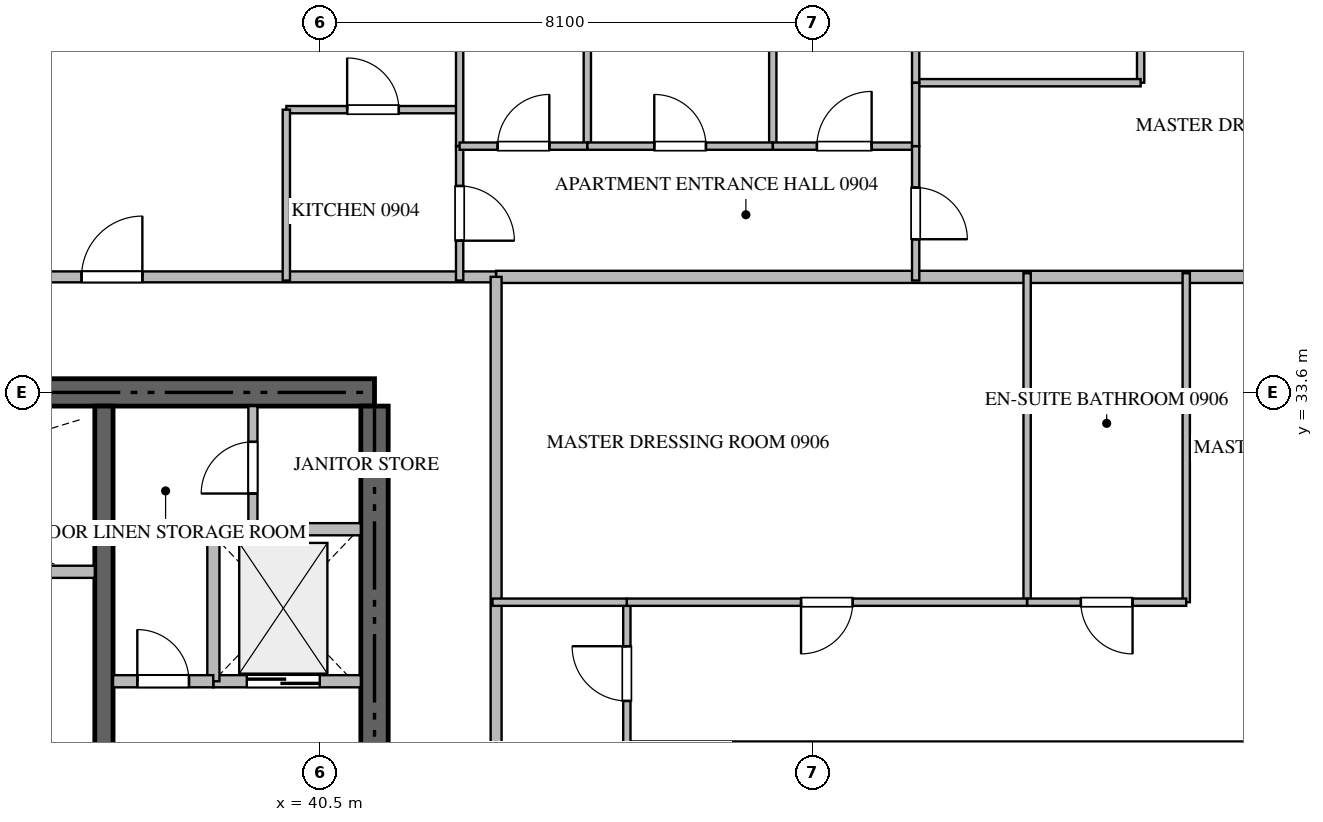
"""IFC4 building model, lengths in metres.
Left out: names, types, materials, properties, quantities, classifications, styles, units other than length and angle.
Written with IfcOpenShell. Run it as: python <this file> out.ifc"""

import sys

from ifc_helpers import new_model, si_unit, direction, frame, frame_2d, origin, place, context, subcontext, project, spatial, rectangle, extrude, source, transform, mapped, element, fill, save


model = new_model("IFC4")
c1 = context("Model", 3, precision=1e-05, world=origin(), true_north=direction((0.0, 1.0)))
c2 = subcontext(c1, "Body", "Model", "MODEL_VIEW")
j1 = project(units=[si_unit("LENGTHUNIT", "METRE"), si_unit("PLANEANGLEUNIT", "RADIAN")], contexts=[c1])
p1 = place(None, origin())
s1 = spatial("IfcSite", under=j1, at=p1, CompositionType="ELEMENT")
p2 = place(p1, origin())
s2 = spatial("IfcBuilding", under=s1, at=p2, CompositionType="ELEMENT")
p3 = place(p2, frame((0.0, 0.0, 41.7)))
s3 = spatial("IfcBuildingStorey", under=s2, at=p3, CompositionType="ELEMENT", Elevation=41.7)
p4 = place(p3, frame((41.4, 33.6, -0.26), z_axis=(0.0, 0.0, 1.0), x_axis=(-1.0, 0.0, 0.0)))
e1 = element("IfcWall", 1, at=p4, inside=s3, PredefinedType="SHEAR", context=c2, shape_type="SweptSolid", body=[
    extrude(rectangle(XDim=18.0, YDim=0.45, at=frame_2d((9.0, 0.0))), origin(), (0.0, 0.0, 1.0), 3.748),
])
p5 = place(p3, frame((41.4, 27.75, -0.26), z_axis=(0.0, 0.0, 1.0), x_axis=(0.0, 1.0, 0.0)))
e2 = element("IfcWall", 2, at=p5, inside=s3, PredefinedType="SHEAR", context=c2, shape_type="SweptSolid", body=[
    extrude(rectangle(XDim=5.625, YDim=0.45, at=frame_2d((2.812, 0.0))), origin(), (0.0, 0.0, 1.0), 3.748),
])
p6 = place(p3, frame((36.95, 27.05, -0.26), z_axis=(0.0, 0.0, 1.0), x_axis=(0.0, 1.0, 0.0)))
e3 = element("IfcWall", 3, at=p6, inside=s3, PredefinedType="SHEAR", context=c2, shape_type="SweptSolid", body=[
    extrude(rectangle(XDim=6.325, YDim=0.3, at=frame_2d((3.163, 0.0))), origin(), (0.0, 0.0, 1.0), 3.748),
])
p7 = place(p3, frame((38.75, 28.85, 0.0), z_axis=(0.0, 0.0, 1.0), x_axis=(1.0, 0.0, 0.0)))
e4 = element("IfcWall", 4, at=p7, inside=s3, PredefinedType="STANDARD", context=c2, shape_type="SweptSolid", body=[
    extrude(rectangle(XDim=2.425, YDim=0.2, at=frame_2d((1.212, 0.0))), origin(), (0.0, 0.0, 1.0), 3.49),
])
p8 = place(p7, frame((0.55, 0.0, 0.0)))
e5 = element("IfcOpeningElement", 5, at=p8, cuts=e4, PredefinedType="OPENING", context=c2, shape_type="SweptSolid", body=[
    extrude(rectangle(XDim=1.2, YDim=2.2, at=frame_2d((0.6, 1.1))), frame((0.0, 0.11, 0.0), z_axis=(0.0, -1.0, 0.0), x_axis=(1.0, 0.0, 0.0)), (0.0, 0.0, 1.0), 0.22),
])
p9 = place(p3, frame((35.0, 30.65, 0.0), z_axis=(0.0, 0.0, 1.0), x_axis=(1.0, 0.0, 0.0)))
e6 = element("IfcWall", 6, at=p9, inside=s3, PredefinedType="STANDARD", context=c2, shape_type="SweptSolid", body=[
    extrude(rectangle(XDim=1.8, YDim=0.2, at=frame_2d((0.9, 0.0))), origin(), (0.0, 0.0, 1.0), 3.49),
])
p10 = place(p3, frame((38.75, 28.85, 0.0), z_axis=(0.0, 0.0, 1.0), x_axis=(0.0, 1.0, 0.0)))
e7 = element("IfcWall", 7, at=p10, inside=s3, PredefinedType="STANDARD", context=c2, shape_type="SweptSolid", body=[
    extrude(rectangle(XDim=2.5, YDim=0.2, at=frame_2d((1.25, 0.0))), origin(), (0.0, 0.0, 1.0), 3.49),
])
p11 = place(p3, frame((38.75, 31.35, 0.0), z_axis=(0.0, 0.0, 1.0), x_axis=(1.0, 0.0, 0.0)))
e8 = element("IfcWall", 8, at=p11, inside=s3, PredefinedType="STANDARD", context=c2, shape_type="SweptSolid", body=[
    extrude(rectangle(XDim=2.425, YDim=0.2, at=frame_2d((1.212, 0.0))), origin(), (0.0, 0.0, 1.0), 3.49),
])
p12 = place(p3, frame((37.1, 28.85, 0.0), z_axis=(0.0, 0.0, 1.0), x_axis=(1.0, 0.0, 0.0)))
e9 = element("IfcWall", 9, at=p12, inside=s3, PredefinedType="STANDARD", context=c2, shape_type="SweptSolid", body=[
    extrude(rectangle(XDim=1.648, YDim=0.2, at=frame_2d((0.824, 0.0))), origin(), (0.0, 0.0, 1.0), 3.49),
])
p13 = place(p12, frame((0.399, 0.0, 0.0)))
e10 = element("IfcOpeningElement", 10, at=p13, cuts=e9, PredefinedType="OPENING", context=c2, shape_type="SweptSolid", body=[
    extrude(rectangle(XDim=0.85, YDim=2.1, at=frame_2d((0.425, 1.05))), frame((0.0, 0.11, 0.0), z_axis=(0.0, -1.0, 0.0), x_axis=(1.0, 0.0, 0.0)), (0.0, 0.0, 1.0), 0.22),
])
p14 = place(p3, frame((39.4, 31.35, 0.0), z_axis=(0.0, 0.0, 1.0), x_axis=(0.0, 1.0, 0.0)))
e11 = element("IfcWall", 11, at=p14, inside=s3, PredefinedType="PARTITIONING", context=c2, shape_type="SweptSolid", body=[
    extrude(rectangle(XDim=2.025, YDim=0.15, at=frame_2d((1.012, 0.0))), origin(), (0.0, 0.0, 1.0), 3.49),
])
p15 = place(p14, frame((0.587, 0.0, 0.0)))
e12 = element("IfcOpeningElement", 12, at=p15, cuts=e11, PredefinedType="OPENING", context=c2, shape_type="SweptSolid", body=[
    extrude(rectangle(XDim=0.85, YDim=2.1, at=frame_2d((0.425, 1.05))), frame((0.0, 0.085, 0.0), z_axis=(0.0, -1.0, 0.0), x_axis=(1.0, 0.0, 0.0)), (0.0, 0.0, 1.0), 0.17),
])
p16 = place(p3, frame((43.4, 35.5, 0.0), z_axis=(0.0, 0.0, 1.0), x_axis=(1.0, 0.0, 0.0)))
e13 = element("IfcWall", 13, at=p16, inside=s3, PredefinedType="PARTITIONING", context=c2, shape_type="SweptSolid", body=[
    extrude(rectangle(XDim=15.318, YDim=0.2, at=frame_2d((7.659, 0.0))), origin(), (0.0, 0.0, 1.0), 3.49),
])
p17 = place(p3, frame((21.402, 35.5, 0.0), z_axis=(0.0, 0.0, 1.0), x_axis=(1.0, 0.0, 0.0)))
e14 = element("IfcWall", 14, at=p17, inside=s3, PredefinedType="PARTITIONING", context=c2, shape_type="SweptSolid", body=[
    extrude(rectangle(XDim=21.996, YDim=0.18, at=frame_2d((10.998, 0.0))), origin(), (0.0, 0.0, 1.0), 3.49),
])
p18 = place(p17, frame((9.952, 0.0, 0.0)))
e15 = element("IfcOpeningElement", 15, at=p18, cuts=e14, PredefinedType="OPENING", context=c2, shape_type="SweptSolid", body=[
    extrude(rectangle(XDim=1.0, YDim=2.15, at=frame_2d((0.5, 1.075))), frame((0.0, 0.1, 0.0), z_axis=(0.0, -1.0, 0.0), x_axis=(1.0, 0.0, 0.0)), (0.0, 0.0, 1.0), 0.2),
])
p19 = place(p17, frame((15.18, 0.0, 0.0)))
e16 = element("IfcOpeningElement", 16, at=p19, cuts=e14, PredefinedType="OPENING", context=c2, shape_type="SweptSolid", body=[
    extrude(rectangle(XDim=1.0, YDim=2.15, at=frame_2d((0.5, 1.075))), frame((0.0, 0.1, 0.0), z_axis=(0.0, -1.0, 0.0), x_axis=(1.0, 0.0, 0.0)), (0.0, 0.0, 1.0), 0.2),
])
p20 = place(p3, frame((43.4, 14.9, 0.0), z_axis=(0.0, 0.0, 1.0), x_axis=(0.0, 1.0, 0.0)))
e17 = element("IfcWall", 17, at=p20, inside=s3, PredefinedType="PARTITIONING", context=c2, shape_type="SweptSolid", body=[
    extrude(rectangle(XDim=20.6, YDim=0.18, at=frame_2d((10.3, 0.0))), origin(), (0.0, 0.0, 1.0), 3.49),
])
p21 = place(p20, frame((1.96, 0.0, 0.0)))
e18 = element("IfcOpeningElement", 18, at=p21, cuts=e17, PredefinedType="OPENING", context=c2, shape_type="SweptSolid", body=[
    extrude(rectangle(XDim=1.0, YDim=2.15, at=frame_2d((0.5, 1.075))), frame((0.0, 0.1, 0.0), z_axis=(0.0, -1.0, 0.0), x_axis=(1.0, 0.0, 0.0)), (0.0, 0.0, 1.0), 0.2),
])
p22 = place(p3, frame((39.95, 38.25, 0.0), z_axis=(0.0, 0.0, 1.0), x_axis=(1.0, 0.0, 0.0)))
e19 = element("IfcWall", 19, at=p22, inside=s3, PredefinedType="PARTITIONING", context=c2, shape_type="SweptSolid", body=[
    extrude(rectangle(XDim=2.85, YDim=0.12, at=frame_2d((1.425, 0.0))), origin(), (0.0, 0.0, 1.0), 3.49),
])
p23 = place(p22, frame((1.0, 0.0, 0.0)))
e20 = element("IfcOpeningElement", 20, at=p23, cuts=e19, PredefinedType="OPENING", context=c2, shape_type="SweptSolid", body=[
    extrude(rectangle(XDim=0.85, YDim=2.1, at=frame_2d((0.425, 1.05))), frame((0.0, 0.07, 0.0), z_axis=(0.0, -1.0, 0.0), x_axis=(1.0, 0.0, 0.0)), (0.0, 0.0, 1.0), 0.14),
])
p24 = place(p3, frame((39.95, 38.25, 0.0), z_axis=(0.0, 0.0, 1.0), x_axis=(0.0, -1.0, 0.0)))
e21 = element("IfcWall", 21, at=p24, inside=s3, PredefinedType="PARTITIONING", context=c2, shape_type="SweptSolid", body=[
    extrude(rectangle(XDim=2.81, YDim=0.12, at=frame_2d((1.405, 0.0))), origin(), (0.0, 0.0, 1.0), 3.49),
])
p25 = place(p3, frame((42.8, 37.65, 0.0), z_axis=(0.0, 0.0, 1.0), x_axis=(0.0, -1.0, 0.0)))
e22 = element("IfcWall", 22, at=p25, inside=s3, PredefinedType="PARTITIONING", context=c2, shape_type="SweptSolid", body=[
    extrude(rectangle(XDim=2.21, YDim=0.12, at=frame_2d((1.105, 0.0))), origin(), (0.0, 0.0, 1.0), 3.49),
])
p26 = place(p25, frame((0.655, 0.0, 0.0)))
e23 = element("IfcOpeningElement", 23, at=p26, cuts=e22, PredefinedType="OPENING", context=c2, shape_type="SweptSolid", body=[
    extrude(rectangle(XDim=0.9, YDim=2.1, at=frame_2d((0.45, 1.05))), frame((0.0, 0.07, 0.0), z_axis=(0.0, -1.0, 0.0), x_axis=(1.0, 0.0, 0.0)), (0.0, 0.0, 1.0), 0.14),
])
p27 = place(p3, frame((42.8, 43.538, 0.0), z_axis=(0.0, 0.0, 1.0), x_axis=(0.0, -1.0, 0.0)))
e24 = element("IfcWall", 24, at=p27, inside=s3, PredefinedType="PARTITIONING", context=c2, shape_type="SweptSolid", body=[
    extrude(rectangle(XDim=5.886, YDim=0.12, at=frame_2d((2.943, 0.0))), origin(), (0.0, 0.0, 1.0), 3.49),
])
p28 = place(p3, frame((47.95, 50.105, 0.0), z_axis=(0.0, 0.0, 1.0), x_axis=(0.0, -1.0, 0.0)))
e25 = element("IfcWall", 25, at=p28, inside=s3, PredefinedType="PARTITIONING", context=c2, shape_type="SweptSolid", body=[
    extrude(rectangle(XDim=12.455, YDim=0.12, at=frame_2d((6.228, 0.0))), origin(), (0.0, 0.0, 1.0), 3.49),
])
p29 = place(p3, frame((44.9, 43.54, 0.0), z_axis=(0.0, 0.0, 1.0), x_axis=(0.0, -1.0, 0.0)))
e26 = element("IfcWall", 26, at=p29, inside=s3, PredefinedType="PARTITIONING", context=c2, shape_type="SweptSolid", body=[
    extrude(rectangle(XDim=5.89, YDim=0.12, at=frame_2d((2.945, 0.0))), origin(), (0.0, 0.0, 1.0), 3.49),
])
p30 = place(p3, frame((42.8, 37.65, 0.0), z_axis=(0.0, 0.0, 1.0), x_axis=(1.0, 0.0, 0.0)))
e27 = element("IfcWall", 27, at=p30, inside=s3, PredefinedType="PARTITIONING", context=c2, shape_type="SweptSolid", body=[
    extrude(rectangle(XDim=2.1, YDim=0.12, at=frame_2d((1.05, 0.0))), origin(), (0.0, 0.0, 1.0), 3.49),
])
p31 = place(p30, frame((0.625, 0.0, 0.0)))
e28 = element("IfcOpeningElement", 28, at=p31, cuts=e27, PredefinedType="OPENING", context=c2, shape_type="SweptSolid", body=[
    extrude(rectangle(XDim=0.85, YDim=2.1, at=frame_2d((0.425, 1.05))), frame((0.0, 0.07, 0.0), z_axis=(0.0, -1.0, 0.0), x_axis=(1.0, 0.0, 0.0)), (0.0, 0.0, 1.0), 0.14),
])
p32 = place(p3, frame((44.902, 37.65, 0.0), z_axis=(0.0, 0.0, 1.0), x_axis=(1.0, 0.0, 0.0)))
e29 = element("IfcWall", 29, at=p32, inside=s3, PredefinedType="PARTITIONING", context=c2, shape_type="SweptSolid", body=[
    extrude(rectangle(XDim=3.048, YDim=0.12, at=frame_2d((1.524, 0.0))), origin(), (0.0, 0.0, 1.0), 3.49),
])
p33 = place(p32, frame((1.099, 0.0, 0.0)))
e30 = element("IfcOpeningElement", 30, at=p33, cuts=e29, PredefinedType="OPENING", context=c2, shape_type="SweptSolid", body=[
    extrude(rectangle(XDim=0.85, YDim=2.1, at=frame_2d((0.425, 1.05))), frame((0.0, 0.07, 0.0), z_axis=(0.0, -1.0, 0.0), x_axis=(1.0, 0.0, 0.0)), (0.0, 0.0, 1.0), 0.14),
])
p34 = place(p3, frame((47.952, 37.65, 0.0), z_axis=(0.0, 0.0, 1.0), x_axis=(1.0, 0.0, 0.0)))
e31 = element("IfcWall", 31, at=p34, inside=s3, PredefinedType="PARTITIONING", context=c2, shape_type="SweptSolid", body=[
    extrude(rectangle(XDim=2.348, YDim=0.12, at=frame_2d((1.174, 0.0))), origin(), (0.0, 0.0, 1.0), 3.49),
])
p35 = place(p34, frame((0.724, 0.0, 0.0)))
e32 = element("IfcOpeningElement", 32, at=p35, cuts=e31, PredefinedType="OPENING", context=c2, shape_type="SweptSolid", body=[
    extrude(rectangle(XDim=0.9, YDim=2.1, at=frame_2d((0.45, 1.05))), frame((0.0, 0.07, 0.0), z_axis=(0.0, -1.0, 0.0), x_axis=(1.0, 0.0, 0.0)), (0.0, 0.0, 1.0), 0.14),
])
p36 = place(p3, frame((54.0, 45.905, 0.0), z_axis=(0.0, 0.0, 1.0), x_axis=(0.0, -1.0, 0.0)))
e33 = element("IfcWall", 33, at=p36, inside=s3, PredefinedType="PARTITIONING", context=c2, shape_type="SweptSolid", body=[
    extrude(rectangle(XDim=7.212, YDim=0.12, at=frame_2d((3.606, 0.0))), origin(), (0.0, 0.0, 1.0), 3.49),
])
p37 = place(p3, frame((50.3, 38.693, 0.0), z_axis=(0.0, 0.0, 1.0), x_axis=(1.0, 0.0, 0.0)))
e34 = element("IfcWall", 34, at=p37, inside=s3, PredefinedType="PARTITIONING", context=c2, shape_type="SweptSolid", body=[
    extrude(rectangle(XDim=3.7, YDim=0.12, at=frame_2d((1.85, 0.0))), origin(), (0.0, 0.0, 1.0), 3.49),
])
p38 = place(p3, frame((50.3, 42.477, 0.0), z_axis=(0.0, 0.0, 1.0), x_axis=(0.0, -1.0, 0.0)))
e35 = element("IfcWall", 35, at=p38, inside=s3, PredefinedType="PARTITIONING", context=c2, shape_type="SweptSolid", body=[
    extrude(rectangle(XDim=3.784, YDim=0.12, at=frame_2d((1.892, 0.0))), origin(), (0.0, 0.0, 1.0), 3.49),
])
p39 = place(p38, frame((1.467, 0.0, 0.0)))
e36 = element("IfcOpeningElement", 36, at=p39, cuts=e35, PredefinedType="OPENING", context=c2, shape_type="SweptSolid", body=[
    extrude(rectangle(XDim=0.85, YDim=2.1, at=frame_2d((0.425, 1.05))), frame((0.0, 0.07, 0.0), z_axis=(0.0, -1.0, 0.0), x_axis=(1.0, 0.0, 0.0)), (0.0, 0.0, 1.0), 0.14),
])
p40 = place(p3, frame((50.3, 38.691, 0.0), z_axis=(0.0, 0.0, 1.0), x_axis=(0.0, -1.0, 0.0)))
e37 = element("IfcWall", 37, at=p40, inside=s3, PredefinedType="PARTITIONING", context=c2, shape_type="SweptSolid", body=[
    extrude(rectangle(XDim=1.041, YDim=0.12, at=frame_2d((0.521, 0.0))), origin(), (0.0, 0.0, 1.0), 3.49),
])
p41 = place(p3, frame((50.3, 37.648, 0.0), z_axis=(0.0, 0.0, 1.0), x_axis=(0.0, -1.0, 0.0)))
e38 = element("IfcWall", 38, at=p41, inside=s3, PredefinedType="PARTITIONING", context=c2, shape_type="SweptSolid", body=[
    extrude(rectangle(XDim=2.208, YDim=0.12, at=frame_2d((1.104, 0.0))), origin(), (0.0, 0.0, 1.0), 3.49),
])
p42 = place(p41, frame((0.679, 0.0, 0.0)))
e39 = element("IfcOpeningElement", 39, at=p42, cuts=e38, PredefinedType="OPENING", context=c2, shape_type="SweptSolid", body=[
    extrude(rectangle(XDim=0.85, YDim=2.1, at=frame_2d((0.425, 1.05))), frame((0.0, 0.07, 0.0), z_axis=(0.0, -1.0, 0.0), x_axis=(1.0, 0.0, 0.0)), (0.0, 0.0, 1.0), 0.14),
])
p43 = place(p3, frame((58.705, 27.8, 0.0), z_axis=(0.0, 0.0, 1.0), x_axis=(-1.0, 0.0, 0.0)))
e40 = element("IfcWall", 40, at=p43, inside=s3, PredefinedType="PARTITIONING", context=c2, shape_type="SweptSolid", body=[
    extrude(rectangle(XDim=13.155, YDim=0.12, at=frame_2d((6.578, 0.0))), origin(), (0.0, 0.0, 1.0), 3.49),
])
p44 = place(p3, frame((45.55, 27.802, 0.0), z_axis=(0.0, 0.0, 1.0), x_axis=(0.0, 1.0, 0.0)))
e41 = element("IfcWall", 41, at=p44, inside=s3, PredefinedType="PARTITIONING", context=c2, shape_type="SweptSolid", body=[
    extrude(rectangle(XDim=2.348, YDim=0.12, at=frame_2d((1.174, 0.0))), origin(), (0.0, 0.0, 1.0), 3.49),
])
p45 = place(p44, frame((0.724, 0.0, 0.0)))
e42 = element("IfcOpeningElement", 42, at=p45, cuts=e41, PredefinedType="OPENING", context=c2, shape_type="SweptSolid", body=[
    extrude(rectangle(XDim=0.9, YDim=2.1, at=frame_2d((0.45, 1.05))), frame((0.0, 0.07, 0.0), z_axis=(0.0, -1.0, 0.0), x_axis=(1.0, 0.0, 0.0)), (0.0, 0.0, 1.0), 0.14),
])
for number, where, z_axis, x_axis in (
    (43, (54.75, 30.15, 0.0), (0.0, 0.0, 1.0), (0.0, 1.0, 0.0)),
    (44, (52.133, 30.15, 0.0), (0.0, 0.0, 1.0), (0.0, 1.0, 0.0)),
):
    element("IfcWall", number, at=place(p3, frame(where, z_axis=z_axis, x_axis=x_axis)), inside=s3, PredefinedType="PARTITIONING", context=c2, shape_type="SweptSolid", body=[
        extrude(rectangle(XDim=5.41, YDim=0.12, at=frame_2d((2.705, 0.0))), origin(), (0.0, 0.0, 1.0), 3.49),
    ])
p46 = place(p3, frame((54.75, 30.15, 0.0), z_axis=(0.0, 0.0, 1.0), x_axis=(-1.0, 0.0, 0.0)))
e45 = element("IfcWall", 45, at=p46, inside=s3, PredefinedType="PARTITIONING", context=c2, shape_type="SweptSolid", body=[
    extrude(rectangle(XDim=2.617, YDim=0.12, at=frame_2d((1.309, 0.0))), origin(), (0.0, 0.0, 1.0), 3.49),
])
p47 = place(p46, frame((0.883, 0.0, 0.0)))
e46 = element("IfcOpeningElement", 46, at=p47, cuts=e45, PredefinedType="OPENING", context=c2, shape_type="SweptSolid", body=[
    extrude(rectangle(XDim=0.85, YDim=2.1, at=frame_2d((0.425, 1.05))), frame((0.0, 0.07, 0.0), z_axis=(0.0, -1.0, 0.0), x_axis=(1.0, 0.0, 0.0)), (0.0, 0.0, 1.0), 0.14),
])
p48 = place(p3, frame((52.131, 30.15, 0.0), z_axis=(0.0, 0.0, 1.0), x_axis=(-1.0, 0.0, 0.0)))
e47 = element("IfcWall", 47, at=p48, inside=s3, PredefinedType="PARTITIONING", context=c2, shape_type="SweptSolid", body=[
    extrude(rectangle(XDim=6.581, YDim=0.12, at=frame_2d((3.291, 0.0))), origin(), (0.0, 0.0, 1.0), 3.49),
])
p49 = place(p48, frame((2.866, 0.0, 0.0)))
e48 = element("IfcOpeningElement", 48, at=p49, cuts=e47, PredefinedType="OPENING", context=c2, shape_type="SweptSolid", body=[
    extrude(rectangle(XDim=0.85, YDim=2.1, at=frame_2d((0.425, 1.05))), frame((0.0, 0.07, 0.0), z_axis=(0.0, -1.0, 0.0), x_axis=(1.0, 0.0, 0.0)), (0.0, 0.0, 1.0), 0.14),
])
p50 = place(p3, frame((45.548, 30.15, 0.0), z_axis=(0.0, 0.0, 1.0), x_axis=(-1.0, 0.0, 0.0)))
e49 = element("IfcWall", 49, at=p50, inside=s3, PredefinedType="PARTITIONING", context=c2, shape_type="SweptSolid", body=[
    extrude(rectangle(XDim=2.208, YDim=0.12, at=frame_2d((1.104, 0.0))), origin(), (0.0, 0.0, 1.0), 3.49),
])
m1 = source(origin(), c2, "Body", "SweptSolid", [
    extrude(rectangle(XDim=1.2, YDim=2.2, at=frame_2d((0.6, 1.1))), frame((0.0, 0.025, 0.0), z_axis=(0.0, -1.0, 0.0), x_axis=(1.0, 0.0, 0.0)), (0.0, 0.0, 1.0), 0.05),
])
p51 = place(p8, origin())
e50 = element("IfcDoor", 50, at=p51, inside=s3, OperationType="DOUBLE_DOOR_SLIDING", PredefinedType="DOOR", context=c2, shape_type="MappedRepresentation", body=[
    mapped(m1, transform((0.0, 0.0, 0.0), scale=1.0)),
])
fill(e5, e50)
m2 = source(origin(), c2, "Body", "SweptSolid", [
    extrude(rectangle(XDim=0.85, YDim=2.1, at=frame_2d((0.425, 1.05))), frame((0.0, 0.025, 0.0), z_axis=(0.0, -1.0, 0.0), x_axis=(1.0, 0.0, 0.0)), (0.0, 0.0, 1.0), 0.05),
])
p52 = place(p13, origin())
e51 = element("IfcDoor", 51, at=p52, inside=s3, OperationType="SINGLE_SWING_LEFT", PredefinedType="DOOR", context=c2, shape_type="MappedRepresentation", body=[
    mapped(m2, transform((0.0, 0.0, 0.0), scale=1.0)),
])
fill(e10, e51)
p53 = place(p15, origin())
e52 = element("IfcDoor", 52, at=p53, inside=s3, OperationType="SINGLE_SWING_LEFT", PredefinedType="DOOR", context=c2, shape_type="MappedRepresentation", body=[
    mapped(m2, transform((0.0, 0.0, 0.0), scale=1.0)),
])
fill(e12, e52)
m3 = source(origin(), c2, "Body", "SweptSolid", [
    extrude(rectangle(XDim=1.0, YDim=2.15, at=frame_2d((0.5, 1.075))), frame((0.0, 0.025, 0.0), z_axis=(0.0, -1.0, 0.0), x_axis=(1.0, 0.0, 0.0)), (0.0, 0.0, 1.0), 0.05),
])
p54 = place(p19, origin())
e53 = element("IfcDoor", 53, at=p54, inside=s3, OperationType="SINGLE_SWING_RIGHT", PredefinedType="DOOR", context=c2, shape_type="MappedRepresentation", body=[
    mapped(m3, transform((0.0, 0.0, 0.0), scale=1.0)),
])
fill(e16, e53)
p55 = place(p23, origin())
e54 = element("IfcDoor", 54, at=p55, inside=s3, OperationType="SINGLE_SWING_LEFT", PredefinedType="DOOR", context=c2, shape_type="MappedRepresentation", body=[
    mapped(m2, transform((0.0, 0.0, 0.0), scale=1.0)),
])
fill(e20, e54)
m4 = source(origin(), c2, "Body", "SweptSolid", [
    extrude(rectangle(XDim=0.9, YDim=2.1, at=frame_2d((0.45, 1.05))), frame((0.0, 0.025, 0.0), z_axis=(0.0, -1.0, 0.0), x_axis=(1.0, 0.0, 0.0)), (0.0, 0.0, 1.0), 0.05),
])
p56 = place(p26, origin())
e55 = element("IfcDoor", 55, at=p56, inside=s3, OperationType="SINGLE_SWING_RIGHT", PredefinedType="DOOR", context=c2, shape_type="MappedRepresentation", body=[
    mapped(m4, transform((0.0, 0.0, 0.0), scale=1.0)),
])
fill(e23, e55)
p57 = place(p31, origin())
e56 = element("IfcDoor", 56, at=p57, inside=s3, OperationType="SINGLE_SWING_RIGHT", PredefinedType="DOOR", context=c2, shape_type="MappedRepresentation", body=[
    mapped(m2, transform((0.0, 0.0, 0.0), scale=1.0)),
])
fill(e28, e56)
p58 = place(p33, origin())
e57 = element("IfcDoor", 57, at=p58, inside=s3, OperationType="SINGLE_SWING_LEFT", PredefinedType="DOOR", context=c2, shape_type="MappedRepresentation", body=[
    mapped(m2, transform((0.0, 0.0, 0.0), scale=1.0)),
])
fill(e30, e57)
p59 = place(p35, origin())
e58 = element("IfcDoor", 58, at=p59, inside=s3, OperationType="SINGLE_SWING_RIGHT", PredefinedType="DOOR", context=c2, shape_type="MappedRepresentation", body=[
    mapped(m4, transform((0.0, 0.0, 0.0), scale=1.0)),
])
fill(e32, e58)
p60 = place(p42, origin())
e59 = element("IfcDoor", 59, at=p60, inside=s3, OperationType="SINGLE_SWING_RIGHT", PredefinedType="DOOR", context=c2, shape_type="MappedRepresentation", body=[
    mapped(m2, transform((0.0, 0.0, 0.0), scale=1.0)),
])
fill(e39, e59)
p61 = place(p45, origin())
e60 = element("IfcDoor", 60, at=p61, inside=s3, OperationType="SINGLE_SWING_RIGHT", PredefinedType="DOOR", context=c2, shape_type="MappedRepresentation", body=[
    mapped(m4, transform((0.0, 0.0, 0.0), scale=1.0)),
])
fill(e42, e60)
p62 = place(p47, origin())
e61 = element("IfcDoor", 61, at=p62, inside=s3, OperationType="SINGLE_SWING_LEFT", PredefinedType="DOOR", context=c2, shape_type="MappedRepresentation", body=[
    mapped(m2, transform((0.0, 0.0, 0.0), scale=1.0)),
])
fill(e46, e61)
p63 = place(p49, origin())
e62 = element("IfcDoor", 62, at=p63, inside=s3, OperationType="SINGLE_SWING_RIGHT", PredefinedType="DOOR", context=c2, shape_type="MappedRepresentation", body=[
    mapped(m2, transform((0.0, 0.0, 0.0), scale=1.0)),
])
fill(e48, e62)
save(model, sys.argv[1])
